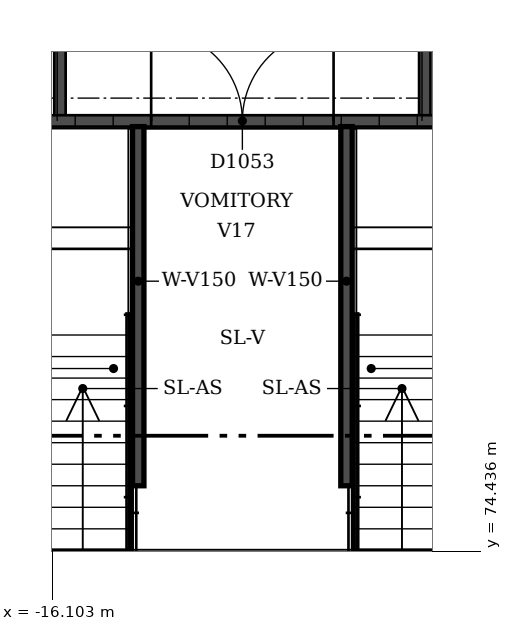
"""IFC4 building model, lengths in metres.
Left out: names, types, materials, properties, quantities, classifications, styles, units other than length and angle.
Written with IfcOpenShell. Run it as: python <this file> out.ifc"""

import sys

from ifc_helpers import new_model, si_unit, direction, frame, frame_2d, origin, place, context, subcontext, project, spatial, rectangle, extrude, element, fill, save


model = new_model("IFC4")
c1 = context("Model", 3, precision=1e-05, world=origin(), true_north=direction((0.0, 1.0)))
c2 = subcontext(c1, "Body", "Model", "MODEL_VIEW")
j1 = project(units=[si_unit("LENGTHUNIT", "METRE"), si_unit("PLANEANGLEUNIT", "RADIAN")], contexts=[c1])
p1 = place(None, origin())
s1 = spatial("IfcSite", under=j1, at=p1, CompositionType="ELEMENT")
p2 = place(p1, origin())
s2 = spatial("IfcBuilding", under=s1, at=p2, CompositionType="ELEMENT")
p3 = place(p2, origin())
s3 = spatial("IfcBuildingStorey", under=s2, at=p3, CompositionType="ELEMENT", Elevation=0.0)
for number, where, z_axis, x_axis in (
    (1, (-11.2, 80.1, 0.0), (0.0, 0.0, 1.0), (0.0, 1.0, 0.0)),
    (2, (-16.0, 80.1, 0.0), (0.0, 0.0, 1.0), (0.0, 1.0, 0.0)),
):
    element("IfcWall", number, at=place(p3, frame(where, z_axis=z_axis, x_axis=x_axis)), inside=s3, PredefinedType="SOLIDWALL", context=c2, shape_type="SweptSolid", body=[
        extrude(rectangle(XDim=4.925, YDim=0.15, at=frame_2d((2.462, 0.0))), origin(), (0.0, 0.0, 1.0), 3.0),
    ])
p4 = place(p3, frame((-20.0, 80.1, 0.0), z_axis=(0.0, 0.0, 1.0), x_axis=(1.0, 0.0, 0.0)))
e3 = element("IfcWall", 3, at=p4, inside=s3, PredefinedType="SOLIDWALL", context=c2, shape_type="SweptSolid", body=[
    extrude(rectangle(XDim=12.7, YDim=0.15, at=frame_2d((6.35, 0.0))), origin(), (0.0, 0.0, 1.0), 3.0),
])
p5 = place(p4, frame((5.2, 0.0, 0.0)))
e4 = element("IfcOpeningElement", 4, at=p5, cuts=e3, PredefinedType="OPENING", context=c2, shape_type="SweptSolid", body=[
    extrude(rectangle(XDim=2.4, YDim=2.4, at=frame_2d((1.2, 1.2))), frame((0.0, 0.075, 0.0), z_axis=(0.0, -1.0, 0.0), x_axis=(1.0, 0.0, 0.0)), (0.0, 0.0, 1.0), 0.15),
])
for number, where, z_axis, x_axis in (
    (5, (-12.23, 75.3, 0.0), (0.0, 0.0, 1.0), (0.0, 1.0, 0.0)),
    (6, (-14.97, 75.3, 0.0), (0.0, 0.0, 1.0), (0.0, 1.0, 0.0)),
):
    element("IfcWall", number, at=place(p3, frame(where, z_axis=z_axis, x_axis=x_axis)), inside=s3, PredefinedType="SOLIDWALL", context=c2, shape_type="SweptSolid", body=[
        extrude(rectangle(XDim=4.725, YDim=0.15, at=frame_2d((2.362, 0.0))), origin(), (0.0, 0.0, 1.0), 2.75),
    ])
p6 = place(p5, origin())
e7 = element("IfcDoor", 7, at=p6, inside=s3, OperationType="DOUBLE_DOOR_SINGLE_SWING", PredefinedType="DOOR", context=c2, shape_type="SweptSolid", body=[
    extrude(rectangle(XDim=2.4, YDim=2.4, at=frame_2d((1.2, 1.2))), frame((0.0, 0.025, 0.0), z_axis=(0.0, -1.0, 0.0), x_axis=(1.0, 0.0, 0.0)), (0.0, 0.0, 1.0), 0.05),
])
fill(e4, e7)
save(model, sys.argv[1])
